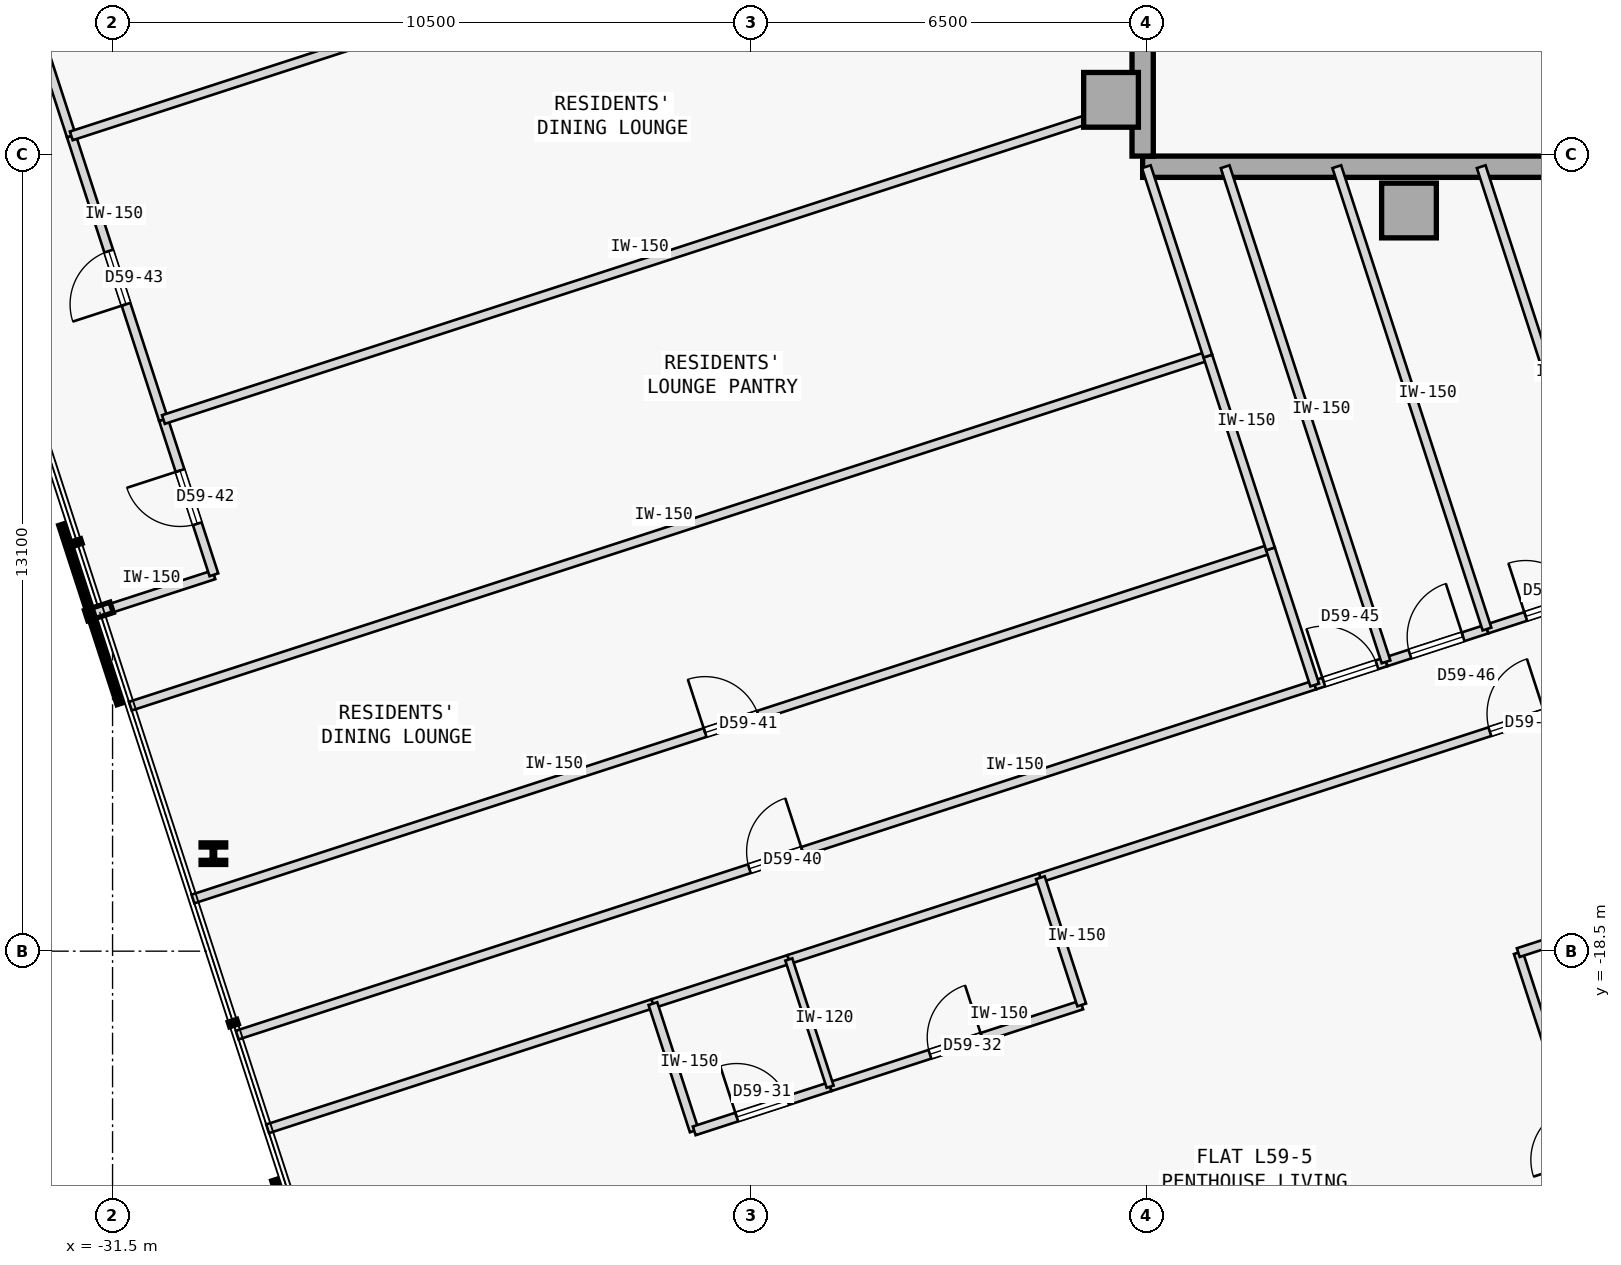
"""IFC4 building model, lengths in metres.
Left out: names, types, materials, properties, quantities, classifications, styles, units other than length and angle.
Written with IfcOpenShell. Run it as: python <this file> out.ifc"""

import sys

from ifc_helpers import new_model, si_unit, direction, frame, frame_2d, origin, origin_2d, place, context, subcontext, project, spatial, rectangle, i_section, extrude, element, fill, save


model = new_model("IFC4")
c1 = context("Model", 3, precision=1e-05, world=origin(), true_north=direction((0.0, 1.0)))
c2 = subcontext(c1, "Body", "Model", "MODEL_VIEW")
j1 = project(units=[si_unit("LENGTHUNIT", "METRE"), si_unit("PLANEANGLEUNIT", "RADIAN")], contexts=[c1])
p1 = place(None, origin())
s1 = spatial("IfcSite", under=j1, at=p1, CompositionType="ELEMENT")
p2 = place(p1, origin())
s2 = spatial("IfcBuilding", under=s1, at=p2, CompositionType="ELEMENT")
p3 = place(p2, frame((0.0, 0.0, 224.3)))
s3 = spatial("IfcBuildingStorey", under=s2, at=p3, CompositionType="ELEMENT", Elevation=224.3)
for number, where, z_axis, x_axis in (
    (1, (-15.08, -4.5, 0.0), (0.0, 0.0, 1.0), (1.0, 0.0, 0.0)),
    (2, (-10.18, -6.32, 0.0), (0.0, 0.0, 1.0), (1.0, 0.0, 0.0)),
):
    element("IfcColumn", number, at=place(p3, frame(where, z_axis=z_axis, x_axis=x_axis)), inside=s3, PredefinedType="COLUMN", context=c2, shape_type="SweptSolid", body=[
        extrude(rectangle(XDim=0.9, YDim=0.9, at=origin_2d()), origin(), (0.0, 0.0, 1.0), 3.35),
    ])
p4 = place(p3, frame((-14.56, -5.6, 0.0), z_axis=(0.0, 0.0, 1.0), x_axis=(1.0, 0.0, 0.0)))
e3 = element("IfcWall", 3, at=p4, inside=s3, PredefinedType="SHEAR", context=c2, shape_type="SweptSolid", body=[
    extrude(rectangle(XDim=10.86, YDim=0.35, at=frame_2d((5.43, 0.0))), origin(), (0.0, 0.0, 1.0), 3.125),
])
p5 = place(p3, frame((-14.56, -5.425, 0.0), z_axis=(0.0, 0.0, 1.0), x_axis=(0.0, 1.0, 0.0)))
e4 = element("IfcWall", 4, at=p5, inside=s3, PredefinedType="SHEAR", context=c2, shape_type="SweptSolid", body=[
    extrude(rectangle(XDim=10.85, YDim=0.35, at=frame_2d((5.425, 0.0))), origin(), (0.0, 0.0, 1.0), 3.125),
])
p6 = place(p3, frame((-29.842, -16.897, 0.0), z_axis=(0.0, 0.0, 1.0), x_axis=(1.0, 0.0, 0.0)))
e5 = element("IfcColumn", 5, at=p6, inside=s3, PredefinedType="COLUMN", context=c2, shape_type="SweptSolid", body=[
    extrude(i_section(OverallWidth=0.405, OverallDepth=0.355, WebThickness=0.042, FlangeThickness=0.068, FilletRadius=0.015, at=origin_2d()), origin(), (0.0, 0.0, 1.0), 3.35),
])
p7 = place(p3, frame((-28.95, -21.421, 0.0), z_axis=(0.0, 0.0, 1.0), x_axis=(0.951059919169, 0.30900652121, 0.0)))
e6 = element("IfcWall", 6, at=p7, inside=s3, PredefinedType="PARTITIONING", context=c2, shape_type="SweptSolid", body=[
    extrude(rectangle(XDim=6.662, YDim=0.15, at=frame_2d((3.331, 0.0))), origin(), (0.0, 0.0, 1.0), 3.125),
])
p8 = place(p3, frame((-16.242, -17.292, 0.0), z_axis=(0.0, 0.0, 1.0), x_axis=(0.951056800106, 0.309016120894, 0.0)))
e7 = element("IfcWall", 7, at=p8, inside=s3, PredefinedType="PARTITIONING", context=c2, shape_type="SweptSolid", body=[
    extrude(rectangle(XDim=16.494, YDim=0.15, at=frame_2d((8.247, 0.0))), origin(), (0.0, 0.0, 1.0), 3.125),
])
p9 = place(p8, frame((7.772, 0.0, 0.0)))
e8 = element("IfcOpeningElement", 8, at=p9, cuts=e7, PredefinedType="OPENING", context=c2, shape_type="SweptSolid", body=[
    extrude(rectangle(XDim=0.95, YDim=2.15, at=frame_2d((0.475, 1.075))), frame((0.0, 0.085, 0.0), z_axis=(0.0, -1.0, 0.0), x_axis=(1.0, 0.0, 0.0)), (0.0, 0.0, 1.0), 0.17),
])
p10 = place(p3, frame((-22.614, -19.363, 0.0), z_axis=(0.0, 0.0, 1.0), x_axis=(0.951045519245, 0.309050837767, 0.0)))
e9 = element("IfcWall", 9, at=p10, inside=s3, PredefinedType="PARTITIONING", context=c2, shape_type="SweptSolid", body=[
    extrude(rectangle(XDim=2.35, YDim=0.15, at=frame_2d((1.175, 0.0))), origin(), (0.0, 0.0, 1.0), 3.125),
])
p11 = place(p3, frame((-20.379, -18.636, 0.0), z_axis=(0.0, 0.0, 1.0), x_axis=(0.951052627573, 0.309028962374, 0.0)))
e10 = element("IfcWall", 10, at=p11, inside=s3, PredefinedType="PARTITIONING", context=c2, shape_type="SweptSolid", body=[
    extrude(rectangle(XDim=4.35, YDim=0.15, at=frame_2d((2.175, 0.0))), origin(), (0.0, 0.0, 1.0), 3.125),
])
p12 = place(p3, frame((-29.45, -19.881, 0.0), z_axis=(0.0, 0.0, 1.0), x_axis=(0.95105650271, 0.309017036186, 0.0)))
e11 = element("IfcWall", 11, at=p12, inside=s3, PredefinedType="PARTITIONING", context=c2, shape_type="SweptSolid", body=[
    extrude(rectangle(XDim=18.632, YDim=0.15, at=frame_2d((9.316, 0.0))), origin(), (0.0, 0.0, 1.0), 3.125),
])
p13 = place(p12, frame((8.856, 0.0, 0.0)))
e12 = element("IfcOpeningElement", 12, at=p13, cuts=e11, PredefinedType="OPENING", context=c2, shape_type="SweptSolid", body=[
    extrude(rectangle(XDim=0.92, YDim=2.15, at=frame_2d((0.46, 1.075))), frame((0.0, 0.085, 0.0), z_axis=(0.0, -1.0, 0.0), x_axis=(1.0, 0.0, 0.0)), (0.0, 0.0, 1.0), 0.17),
])
p14 = place(p3, frame((-31.712, -12.921, 0.0), z_axis=(0.0, 0.0, 1.0), x_axis=(0.951054051148, 0.309024581215, 0.0)))
e13 = element("IfcWall", 13, at=p14, inside=s3, PredefinedType="PARTITIONING", context=c2, shape_type="SweptSolid", body=[
    extrude(rectangle(XDim=1.975, YDim=0.15, at=frame_2d((0.988, 0.0))), origin(), (0.0, 0.0, 1.0), 3.125),
])
p15 = place(p3, frame((-29.833, -12.311, 0.0), z_axis=(0.0, 0.0, 1.0), x_axis=(-0.309044953986, 0.951047431213, 0.0)))
e14 = element("IfcWall", 14, at=p15, inside=s3, PredefinedType="PARTITIONING", context=c2, shape_type="SweptSolid", body=[
    extrude(rectangle(XDim=2.685, YDim=0.15, at=frame_2d((1.343, 0.0))), origin(), (0.0, 0.0, 1.0), 3.125),
])
p16 = place(p15, frame((0.883, 0.0, 0.0)))
e15 = element("IfcOpeningElement", 15, at=p16, cuts=e14, PredefinedType="OPENING", context=c2, shape_type="SweptSolid", body=[
    extrude(rectangle(XDim=0.92, YDim=2.15, at=frame_2d((0.46, 1.075))), frame((0.0, 0.085, 0.0), z_axis=(0.0, -1.0, 0.0), x_axis=(1.0, 0.0, 0.0)), (0.0, 0.0, 1.0), 0.17),
])
p17 = place(p3, frame((-30.663, -9.757, 0.0), z_axis=(0.0, 0.0, 1.0), x_axis=(-0.309019653166, 0.951055652397, 0.0)))
e16 = element("IfcWall", 16, at=p17, inside=s3, PredefinedType="PARTITIONING", context=c2, shape_type="SweptSolid", body=[
    extrude(rectangle(XDim=4.904, YDim=0.15, at=frame_2d((2.452, 0.0))), origin(), (0.0, 0.0, 1.0), 3.125),
])
p18 = place(p17, frame((1.992, 0.0, 0.0)))
e17 = element("IfcOpeningElement", 17, at=p18, cuts=e16, PredefinedType="OPENING", context=c2, shape_type="SweptSolid", body=[
    extrude(rectangle(XDim=0.92, YDim=2.15, at=frame_2d((0.46, 1.075))), frame((0.0, 0.085, 0.0), z_axis=(0.0, -1.0, 0.0), x_axis=(1.0, 0.0, 0.0)), (0.0, 0.0, 1.0), 0.17),
])
p19 = place(p3, frame((-32.179, -5.093, 0.0), z_axis=(0.0, 0.0, 1.0), x_axis=(-0.309014532869, 0.951057316083, 0.0)))
e18 = element("IfcWall", 18, at=p19, inside=s3, PredefinedType="PARTITIONING", context=c2, shape_type="SweptSolid", body=[
    extrude(rectangle(XDim=4.707, YDim=0.15, at=frame_2d((2.354, 0.0))), origin(), (0.0, 0.0, 1.0), 3.125),
])
p20 = place(p3, frame((-11.73, -14.123, 0.0), z_axis=(0.0, 0.0, 1.0), x_axis=(0.951032613602, 0.309090549622, 0.0)))
e19 = element("IfcWall", 19, at=p20, inside=s3, PredefinedType="PARTITIONING", context=c2, shape_type="SweptSolid", body=[
    extrude(rectangle(XDim=1.233, YDim=0.15, at=frame_2d((0.616, 0.0))), origin(), (0.0, 0.0, 1.0), 3.125),
])
p21 = place(p20, frame((0.156, 0.0, 0.0)))
e20 = element("IfcOpeningElement", 20, at=p21, cuts=e19, PredefinedType="OPENING", context=c2, shape_type="SweptSolid", body=[
    extrude(rectangle(XDim=0.92, YDim=2.15, at=frame_2d((0.46, 1.075))), frame((0.0, 0.085, 0.0), z_axis=(0.0, -1.0, 0.0), x_axis=(1.0, 0.0, 0.0)), (0.0, 0.0, 1.0), 0.17),
])
p22 = place(p3, frame((-10.558, -13.742, 0.0), z_axis=(0.0, 0.0, 1.0), x_axis=(0.951060780507, 0.309003870173, 0.0)))
e21 = element("IfcWall", 21, at=p22, inside=s3, PredefinedType="PARTITIONING", context=c2, shape_type="SweptSolid", body=[
    extrude(rectangle(XDim=1.746, YDim=0.15, at=frame_2d((0.873, 0.0))), origin(), (0.0, 0.0, 1.0), 3.125),
])
p23 = place(p22, frame((0.413, 0.0, 0.0)))
e22 = element("IfcOpeningElement", 22, at=p23, cuts=e21, PredefinedType="OPENING", context=c2, shape_type="SweptSolid", body=[
    extrude(rectangle(XDim=0.92, YDim=2.15, at=frame_2d((0.46, 1.075))), frame((0.0, 0.085, 0.0), z_axis=(0.0, -1.0, 0.0), x_axis=(1.0, 0.0, 0.0)), (0.0, 0.0, 1.0), 0.17),
])
p24 = place(p3, frame((-8.897, -13.202, 0.0), z_axis=(0.0, 0.0, 1.0), x_axis=(0.951065832698, 0.308988319964, 0.0)))
e23 = element("IfcWall", 23, at=p24, inside=s3, PredefinedType="PARTITIONING", context=c2, shape_type="SweptSolid", body=[
    extrude(rectangle(XDim=2.259, YDim=0.15, at=frame_2d((1.129, 0.0))), origin(), (0.0, 0.0, 1.0), 3.125),
])
p25 = place(p24, frame((0.669, 0.0, 0.0)))
e24 = element("IfcOpeningElement", 24, at=p25, cuts=e23, PredefinedType="OPENING", context=c2, shape_type="SweptSolid", body=[
    extrude(rectangle(XDim=0.92, YDim=2.15, at=frame_2d((0.46, 1.075))), frame((0.0, 0.085, 0.0), z_axis=(0.0, -1.0, 0.0), x_axis=(1.0, 0.0, 0.0)), (0.0, 0.0, 1.0), 0.17),
])
p26 = place(p3, frame((-21.934, -21.455, 0.0), z_axis=(0.0, 0.0, 1.0), x_axis=(-0.309060979314, 0.951042223598, 0.0)))
e25 = element("IfcWall", 25, at=p26, inside=s3, PredefinedType="PARTITIONING", context=c2, shape_type="SweptSolid", body=[
    extrude(rectangle(XDim=2.2, YDim=0.15, at=frame_2d((1.1, 0.0))), origin(), (0.0, 0.0, 1.0), 3.125),
])
p27 = place(p3, frame((-21.934, -21.455, 0.0), z_axis=(0.0, 0.0, 1.0), x_axis=(0.951035595692, 0.309081373955, 0.0)))
e26 = element("IfcWall", 26, at=p27, inside=s3, PredefinedType="PARTITIONING", context=c2, shape_type="SweptSolid", body=[
    extrude(rectangle(XDim=2.35, YDim=0.15, at=frame_2d((1.175, 0.0))), origin(), (0.0, 0.0, 1.0), 3.125),
])
p28 = place(p27, frame((0.735, 0.0, 0.0)))
e27 = element("IfcOpeningElement", 27, at=p28, cuts=e26, PredefinedType="OPENING", context=c2, shape_type="SweptSolid", body=[
    extrude(rectangle(XDim=0.88, YDim=2.15, at=frame_2d((0.44, 1.075))), frame((0.0, 0.085, 0.0), z_axis=(0.0, -1.0, 0.0), x_axis=(1.0, 0.0, 0.0)), (0.0, 0.0, 1.0), 0.17),
])
p29 = place(p3, frame((-19.699, -20.729, 0.0), z_axis=(0.0, 0.0, 1.0), x_axis=(0.951057987102, 0.309012467661, 0.0)))
e28 = element("IfcWall", 28, at=p29, inside=s3, PredefinedType="PARTITIONING", context=c2, shape_type="SweptSolid", body=[
    extrude(rectangle(XDim=4.35, YDim=0.15, at=frame_2d((2.175, 0.0))), origin(), (0.0, 0.0, 1.0), 3.125),
])
p30 = place(p29, frame((1.725, 0.0, 0.0)))
e29 = element("IfcOpeningElement", 29, at=p30, cuts=e28, PredefinedType="OPENING", context=c2, shape_type="SweptSolid", body=[
    extrude(rectangle(XDim=0.9, YDim=2.15, at=frame_2d((0.45, 1.075))), frame((0.0, 0.085, 0.0), z_axis=(0.0, -1.0, 0.0), x_axis=(1.0, 0.0, 0.0)), (0.0, 0.0, 1.0), 0.17),
])
p31 = place(p3, frame((-15.562, -19.385, 0.0), z_axis=(0.0, 0.0, 1.0), x_axis=(-0.309060979314, 0.951042223598, 0.0)))
e30 = element("IfcWall", 30, at=p31, inside=s3, PredefinedType="PARTITIONING", context=c2, shape_type="SweptSolid", body=[
    extrude(rectangle(XDim=2.2, YDim=0.15, at=frame_2d((1.1, 0.0))), origin(), (0.0, 0.0, 1.0), 3.125),
])
p32 = place(p3, frame((-6.448, -24.479, 0.0), z_axis=(0.0, 0.0, 1.0), x_axis=(-0.309049046683, 0.951046101272, 0.0)))
e31 = element("IfcWall", 31, at=p32, inside=s3, PredefinedType="PARTITIONING", context=c2, shape_type="SweptSolid", body=[
    extrude(rectangle(XDim=6.262, YDim=0.15, at=frame_2d((3.131, 0.0))), origin(), (0.0, 0.0, 1.0), 3.125),
])
p33 = place(p32, frame((2.681, 0.0, 0.0)))
e32 = element("IfcOpeningElement", 32, at=p33, cuts=e31, PredefinedType="OPENING", context=c2, shape_type="SweptSolid", body=[
    extrude(rectangle(XDim=0.9, YDim=2.15, at=frame_2d((0.45, 1.075))), frame((0.0, 0.085, 0.0), z_axis=(0.0, -1.0, 0.0), x_axis=(1.0, 0.0, 0.0)), (0.0, 0.0, 1.0), 0.17),
])
p34 = place(p3, frame((-8.383, -18.524, 0.0), z_axis=(0.0, 0.0, 1.0), x_axis=(0.951055286502, 0.309020779263, 0.0)))
e33 = element("IfcWall", 33, at=p34, inside=s3, PredefinedType="PARTITIONING", context=c2, shape_type="SweptSolid", body=[
    extrude(rectangle(XDim=4.65, YDim=0.15, at=frame_2d((2.325, 0.0))), origin(), (0.0, 0.0, 1.0), 3.125),
])
p35 = place(p3, frame((-19.699, -20.729, 0.0), z_axis=(0.0, 0.0, 1.0), x_axis=(-0.308960600764, 0.951074837842, 0.0)))
e34 = element("IfcWall", 34, at=p35, inside=s3, PredefinedType="PARTITIONING", context=c2, shape_type="SweptSolid", body=[
    extrude(rectangle(XDim=2.2, YDim=0.12, at=frame_2d((1.1, 0.0))), origin(), (0.0, 0.0, 1.0), 3.125),
])
p36 = place(p3, frame((-30.178, -17.642, 0.0), z_axis=(0.0, 0.0, 1.0), x_axis=(0.95105650271, 0.309017036186, 0.0)))
e35 = element("IfcWall", 35, at=p36, inside=s3, PredefinedType="PARTITIONING", context=c2, shape_type="SweptSolid", body=[
    extrude(rectangle(XDim=18.632, YDim=0.15, at=frame_2d((9.316, 0.0))), origin(), (0.0, 0.0, 1.0), 3.125),
])
p37 = place(p36, frame((8.856, 0.0, 0.0)))
e36 = element("IfcOpeningElement", 36, at=p37, cuts=e35, PredefinedType="OPENING", context=c2, shape_type="SweptSolid", body=[
    extrude(rectangle(XDim=0.92, YDim=2.15, at=frame_2d((0.46, 1.075))), frame((0.0, 0.085, 0.0), z_axis=(0.0, -1.0, 0.0), x_axis=(1.0, 0.0, 0.0)), (0.0, 0.0, 1.0), 0.17),
])
p38 = place(p3, frame((-11.73, -14.123, 0.0), z_axis=(0.0, 0.0, 1.0), x_axis=(-0.309062621189, 0.951041690035, 0.0)))
e37 = element("IfcWall", 37, at=p38, inside=s3, PredefinedType="PARTITIONING", context=c2, shape_type="SweptSolid", body=[
    extrude(rectangle(XDim=2.354, YDim=0.15, at=frame_2d((1.177, 0.0))), origin(), (0.0, 0.0, 1.0), 3.125),
])
p39 = place(p3, frame((-31.208, -14.471, 0.0), z_axis=(0.0, 0.0, 1.0), x_axis=(0.951057753948, 0.309013185244, 0.0)))
e38 = element("IfcWall", 38, at=p39, inside=s3, PredefinedType="PARTITIONING", context=c2, shape_type="SweptSolid", body=[
    extrude(rectangle(XDim=18.632, YDim=0.15, at=frame_2d((9.316, 0.0))), origin(), (0.0, 0.0, 1.0), 3.125),
])
p40 = place(p3, frame((-12.458, -11.884, 0.0), z_axis=(0.0, 0.0, 1.0), x_axis=(-0.308946982245, 0.951079261766, 0.0)))
e39 = element("IfcWall", 39, at=p40, inside=s3, PredefinedType="PARTITIONING", context=c2, shape_type="SweptSolid", body=[
    extrude(rectangle(XDim=3.334, YDim=0.15, at=frame_2d((1.667, 0.0))), origin(), (0.0, 0.0, 1.0), 3.125),
])
p41 = place(p3, frame((-30.663, -9.757, 0.0), z_axis=(0.0, 0.0, 1.0), x_axis=(0.951058192995, 0.309011833974, 0.0)))
e40 = element("IfcWall", 40, at=p41, inside=s3, PredefinedType="PARTITIONING", context=c2, shape_type="SweptSolid", body=[
    extrude(rectangle(XDim=16.657, YDim=0.15, at=frame_2d((8.329, 0.0))), origin(), (0.0, 0.0, 1.0), 3.125),
])
p42 = place(p3, frame((-13.488, -8.713, 0.0), z_axis=(0.0, 0.0, 1.0), x_axis=(-0.309082700143, 0.951035164687, 0.0)))
e41 = element("IfcWall", 41, at=p42, inside=s3, PredefinedType="PARTITIONING", context=c2, shape_type="SweptSolid", body=[
    extrude(rectangle(XDim=3.274, YDim=0.15, at=frame_2d((1.637, 0.0))), origin(), (0.0, 0.0, 1.0), 3.125),
])
p43 = place(p3, frame((-32.179, -5.093, 0.0), z_axis=(0.0, 0.0, 1.0), x_axis=(0.951053885426, 0.309025091239, 0.0)))
e42 = element("IfcWall", 42, at=p43, inside=s3, PredefinedType="PARTITIONING", context=c2, shape_type="SweptSolid", body=[
    extrude(rectangle(XDim=16.657, YDim=0.15, at=frame_2d((8.329, 0.0))), origin(), (0.0, 0.0, 1.0), 3.125),
])
p44 = place(p3, frame((-10.558, -13.742, 0.0), z_axis=(0.0, 0.0, 1.0), x_axis=(-0.309023521796, 0.951054395383, 0.0)))
e43 = element("IfcWall", 43, at=p44, inside=s3, PredefinedType="PARTITIONING", context=c2, shape_type="SweptSolid", body=[
    extrude(rectangle(XDim=8.561, YDim=0.15, at=frame_2d((4.28, 0.0))), origin(), (0.0, 0.0, 1.0), 3.125),
])
p45 = place(p3, frame((-8.897, -13.202, 0.0), z_axis=(0.0, 0.0, 1.0), x_axis=(-0.309008036968, 0.951059426687, 0.0)))
e44 = element("IfcWall", 44, at=p45, inside=s3, PredefinedType="PARTITIONING", context=c2, shape_type="SweptSolid", body=[
    extrude(rectangle(XDim=7.994, YDim=0.15, at=frame_2d((3.997, 0.0))), origin(), (0.0, 0.0, 1.0), 3.125),
])
p46 = place(p3, frame((-6.749, -12.504, 0.0), z_axis=(0.0, 0.0, 1.0), x_axis=(-0.309005471061, 0.95106026037, 0.0)))
e45 = element("IfcWall", 45, at=p46, inside=s3, PredefinedType="PARTITIONING", context=c2, shape_type="SweptSolid", body=[
    extrude(rectangle(XDim=7.26, YDim=0.15, at=frame_2d((3.63, 0.0))), origin(), (0.0, 0.0, 1.0), 3.125),
])
p47 = place(p9, origin())
e46 = element("IfcDoor", 46, at=p47, inside=s3, OperationType="SINGLE_SWING_RIGHT", PredefinedType="DOOR", context=c2, shape_type="SweptSolid", body=[
    extrude(rectangle(XDim=0.95, YDim=2.15, at=frame_2d((0.475, 1.075))), frame((0.0, 0.025, 0.0), z_axis=(0.0, -1.0, 0.0), x_axis=(1.0, 0.0, 0.0)), (0.0, 0.0, 1.0), 0.05),
])
fill(e8, e46)
p48 = place(p28, origin())
e47 = element("IfcDoor", 47, at=p48, inside=s3, OperationType="SINGLE_SWING_LEFT", PredefinedType="DOOR", context=c2, shape_type="SweptSolid", body=[
    extrude(rectangle(XDim=0.88, YDim=2.15, at=frame_2d((0.44, 1.075))), frame((0.0, 0.025, 0.0), z_axis=(0.0, -1.0, 0.0), x_axis=(1.0, 0.0, 0.0)), (0.0, 0.0, 1.0), 0.05),
])
fill(e27, e47)
p49 = place(p30, origin())
e48 = element("IfcDoor", 48, at=p49, inside=s3, OperationType="SINGLE_SWING_RIGHT", PredefinedType="DOOR", context=c2, shape_type="SweptSolid", body=[
    extrude(rectangle(XDim=0.9, YDim=2.15, at=frame_2d((0.45, 1.075))), frame((0.0, 0.025, 0.0), z_axis=(0.0, -1.0, 0.0), x_axis=(1.0, 0.0, 0.0)), (0.0, 0.0, 1.0), 0.05),
])
fill(e29, e48)
p50 = place(p13, origin())
e49 = element("IfcDoor", 49, at=p50, inside=s3, OperationType="SINGLE_SWING_RIGHT", PredefinedType="DOOR", context=c2, shape_type="SweptSolid", body=[
    extrude(rectangle(XDim=0.92, YDim=2.15, at=frame_2d((0.46, 1.075))), frame((0.0, 0.025, 0.0), z_axis=(0.0, -1.0, 0.0), x_axis=(1.0, 0.0, 0.0)), (0.0, 0.0, 1.0), 0.05),
])
fill(e12, e49)
p51 = place(p37, origin())
e50 = element("IfcDoor", 50, at=p51, inside=s3, OperationType="SINGLE_SWING_LEFT", PredefinedType="DOOR", context=c2, shape_type="SweptSolid", body=[
    extrude(rectangle(XDim=0.92, YDim=2.15, at=frame_2d((0.46, 1.075))), frame((0.0, 0.025, 0.0), z_axis=(0.0, -1.0, 0.0), x_axis=(1.0, 0.0, 0.0)), (0.0, 0.0, 1.0), 0.05),
])
fill(e36, e50)
p52 = place(p16, origin())
e51 = element("IfcDoor", 51, at=p52, inside=s3, OperationType="SINGLE_SWING_RIGHT", PredefinedType="DOOR", context=c2, shape_type="SweptSolid", body=[
    extrude(rectangle(XDim=0.92, YDim=2.15, at=frame_2d((0.46, 1.075))), frame((0.0, 0.025, 0.0), z_axis=(0.0, -1.0, 0.0), x_axis=(1.0, 0.0, 0.0)), (0.0, 0.0, 1.0), 0.05),
])
fill(e15, e51)
p53 = place(p18, origin())
e52 = element("IfcDoor", 52, at=p53, inside=s3, OperationType="SINGLE_SWING_LEFT", PredefinedType="DOOR", context=c2, shape_type="SweptSolid", body=[
    extrude(rectangle(XDim=0.92, YDim=2.15, at=frame_2d((0.46, 1.075))), frame((0.0, 0.025, 0.0), z_axis=(0.0, -1.0, 0.0), x_axis=(1.0, 0.0, 0.0)), (0.0, 0.0, 1.0), 0.05),
])
fill(e17, e52)
p54 = place(p21, origin())
e53 = element("IfcDoor", 53, at=p54, inside=s3, OperationType="SINGLE_SWING_LEFT", PredefinedType="DOOR", context=c2, shape_type="SweptSolid", body=[
    extrude(rectangle(XDim=0.92, YDim=2.15, at=frame_2d((0.46, 1.075))), frame((0.0, 0.025, 0.0), z_axis=(0.0, -1.0, 0.0), x_axis=(1.0, 0.0, 0.0)), (0.0, 0.0, 1.0), 0.05),
])
fill(e20, e53)
p55 = place(p23, origin())
e54 = element("IfcDoor", 54, at=p55, inside=s3, OperationType="SINGLE_SWING_RIGHT", PredefinedType="DOOR", context=c2, shape_type="SweptSolid", body=[
    extrude(rectangle(XDim=0.92, YDim=2.15, at=frame_2d((0.46, 1.075))), frame((0.0, 0.025, 0.0), z_axis=(0.0, -1.0, 0.0), x_axis=(1.0, 0.0, 0.0)), (0.0, 0.0, 1.0), 0.05),
])
fill(e22, e54)
p56 = place(p25, origin())
e55 = element("IfcDoor", 55, at=p56, inside=s3, OperationType="SINGLE_SWING_LEFT", PredefinedType="DOOR", context=c2, shape_type="SweptSolid", body=[
    extrude(rectangle(XDim=0.92, YDim=2.15, at=frame_2d((0.46, 1.075))), frame((0.0, 0.025, 0.0), z_axis=(0.0, -1.0, 0.0), x_axis=(1.0, 0.0, 0.0)), (0.0, 0.0, 1.0), 0.05),
])
fill(e24, e55)
save(model, sys.argv[1])
